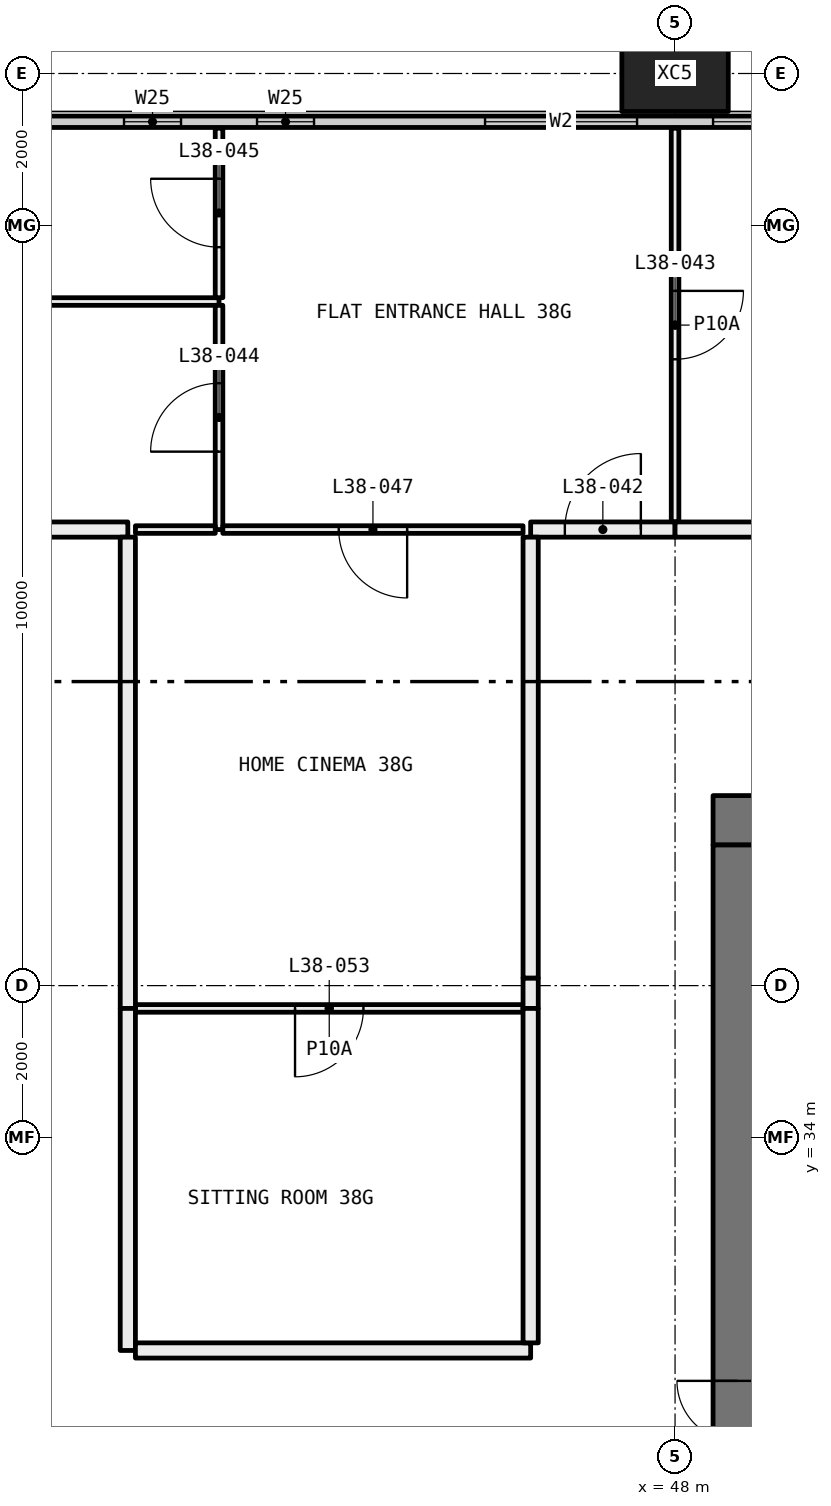
"""IFC4 building model, lengths in metres.
Left out: names, types, materials, properties, quantities, classifications, styles, units other than length and angle.
Written with IfcOpenShell. Run it as: python <this file> out.ifc"""

import sys

from ifc_helpers import new_model, si_unit, direction, frame, frame_2d, origin, origin_2d, place, context, subcontext, project, spatial, rectangle, hollow_rectangle, extrude, element, fill, save


model = new_model("IFC4")
c1 = context("Model", 3, precision=1e-05, world=origin(), true_north=direction((0.0, 1.0)))
c2 = subcontext(c1, "Body", "Model", "MODEL_VIEW")
j1 = project(units=[si_unit("LENGTHUNIT", "METRE"), si_unit("PLANEANGLEUNIT", "RADIAN")], contexts=[c1])
p1 = place(None, origin())
s1 = spatial("IfcSite", under=j1, at=p1, CompositionType="ELEMENT")
p2 = place(p1, origin())
s2 = spatial("IfcBuilding", under=s1, at=p2, CompositionType="ELEMENT")
p3 = place(p2, frame((0.0, 0.0, 144.9)))
s3 = spatial("IfcBuildingStorey", under=s2, at=p3, CompositionType="ELEMENT", Elevation=144.9)
p4 = place(p3, frame((48.0, 48.0, -0.4), z_axis=(0.0, 0.0, 1.0), x_axis=(1.0, 0.0, 0.0)))
e1 = element("IfcColumn", 1, at=p4, inside=s3, PredefinedType="COLUMN", context=c2, shape_type="SweptSolid", body=[
    extrude(hollow_rectangle(XDim=1.4, YDim=1.0, WallThickness=0.055, at=origin_2d()), origin(), (0.0, 0.0, 1.0), 3.45),
])
p5 = place(p3, frame((6.56, 47.365, 0.0), z_axis=(0.0, 0.0, 1.0), x_axis=(1.0, 0.0, 0.0)))
e2 = element("IfcWall", 2, at=p5, inside=s3, PredefinedType="ELEMENTEDWALL", context=c2, shape_type="SweptSolid", body=[
    extrude(rectangle(XDim=58.88, YDim=0.15, at=frame_2d((29.44, 0.0))), origin(), (0.0, 0.0, 1.0), 3.05),
])
p6 = place(p5, frame((0.44, 0.0, 0.45)))
e3 = element("IfcOpeningElement", 3, at=p6, cuts=e2, PredefinedType="OPENING", context=c2, shape_type="SweptSolid", body=[
    extrude(rectangle(XDim=4.5, YDim=2.55, at=frame_2d((2.25, 1.275))), frame((0.0, 0.085, 0.0), z_axis=(0.0, -1.0, 0.0), x_axis=(1.0, 0.0, 0.0)), (0.0, 0.0, 1.0), 0.17),
])
p7 = place(p5, frame((5.94, 0.0, 0.45)))
e4 = element("IfcOpeningElement", 4, at=p7, cuts=e2, PredefinedType="OPENING", context=c2, shape_type="SweptSolid", body=[
    extrude(rectangle(XDim=2.0, YDim=2.55, at=frame_2d((1.0, 1.275))), frame((0.0, 0.085, 0.0), z_axis=(0.0, -1.0, 0.0), x_axis=(1.0, 0.0, 0.0)), (0.0, 0.0, 1.0), 0.17),
])
p8 = place(p5, frame((10.19, 0.0, 0.45)))
e5 = element("IfcOpeningElement", 5, at=p8, cuts=e2, PredefinedType="OPENING", context=c2, shape_type="SweptSolid", body=[
    extrude(rectangle(XDim=0.75, YDim=2.55, at=frame_2d((0.375, 1.275))), frame((0.0, 0.085, 0.0), z_axis=(0.0, -1.0, 0.0), x_axis=(1.0, 0.0, 0.0)), (0.0, 0.0, 1.0), 0.17),
])
p9 = place(p5, frame((11.94, 0.0, 0.45)))
e6 = element("IfcOpeningElement", 6, at=p9, cuts=e2, PredefinedType="OPENING", context=c2, shape_type="SweptSolid", body=[
    extrude(rectangle(XDim=0.75, YDim=2.55, at=frame_2d((0.375, 1.275))), frame((0.0, 0.085, 0.0), z_axis=(0.0, -1.0, 0.0), x_axis=(1.0, 0.0, 0.0)), (0.0, 0.0, 1.0), 0.17),
])
p10 = place(p5, frame((14.94, 0.0, 0.45)))
e7 = element("IfcOpeningElement", 7, at=p10, cuts=e2, PredefinedType="OPENING", context=c2, shape_type="SweptSolid", body=[
    extrude(rectangle(XDim=2.0, YDim=2.55, at=frame_2d((1.0, 1.275))), frame((0.0, 0.085, 0.0), z_axis=(0.0, -1.0, 0.0), x_axis=(1.0, 0.0, 0.0)), (0.0, 0.0, 1.0), 0.17),
])
p11 = place(p5, frame((17.94, 0.0, 0.45)))
e8 = element("IfcOpeningElement", 8, at=p11, cuts=e2, PredefinedType="OPENING", context=c2, shape_type="SweptSolid", body=[
    extrude(rectangle(XDim=2.0, YDim=2.55, at=frame_2d((1.0, 1.275))), frame((0.0, 0.085, 0.0), z_axis=(0.0, -1.0, 0.0), x_axis=(1.0, 0.0, 0.0)), (0.0, 0.0, 1.0), 0.17),
])
p12 = place(p5, frame((22.19, 0.0, 0.45)))
e9 = element("IfcOpeningElement", 9, at=p12, cuts=e2, PredefinedType="OPENING", context=c2, shape_type="SweptSolid", body=[
    extrude(rectangle(XDim=0.75, YDim=2.55, at=frame_2d((0.375, 1.275))), frame((0.0, 0.085, 0.0), z_axis=(0.0, -1.0, 0.0), x_axis=(1.0, 0.0, 0.0)), (0.0, 0.0, 1.0), 0.17),
])
p13 = place(p5, frame((23.94, 0.0, 0.45)))
e10 = element("IfcOpeningElement", 10, at=p13, cuts=e2, PredefinedType="OPENING", context=c2, shape_type="SweptSolid", body=[
    extrude(rectangle(XDim=0.75, YDim=2.55, at=frame_2d((0.375, 1.275))), frame((0.0, 0.085, 0.0), z_axis=(0.0, -1.0, 0.0), x_axis=(1.0, 0.0, 0.0)), (0.0, 0.0, 1.0), 0.17),
])
p14 = place(p5, frame((26.94, 0.0, 0.45)))
e11 = element("IfcOpeningElement", 11, at=p14, cuts=e2, PredefinedType="OPENING", context=c2, shape_type="SweptSolid", body=[
    extrude(rectangle(XDim=2.0, YDim=2.55, at=frame_2d((1.0, 1.275))), frame((0.0, 0.085, 0.0), z_axis=(0.0, -1.0, 0.0), x_axis=(1.0, 0.0, 0.0)), (0.0, 0.0, 1.0), 0.17),
])
p15 = place(p5, frame((29.94, 0.0, 0.45)))
e12 = element("IfcOpeningElement", 12, at=p15, cuts=e2, PredefinedType="OPENING", context=c2, shape_type="SweptSolid", body=[
    extrude(rectangle(XDim=2.0, YDim=2.55, at=frame_2d((1.0, 1.275))), frame((0.0, 0.085, 0.0), z_axis=(0.0, -1.0, 0.0), x_axis=(1.0, 0.0, 0.0)), (0.0, 0.0, 1.0), 0.17),
])
p16 = place(p5, frame((34.19, 0.0, 0.45)))
e13 = element("IfcOpeningElement", 13, at=p16, cuts=e2, PredefinedType="OPENING", context=c2, shape_type="SweptSolid", body=[
    extrude(rectangle(XDim=0.75, YDim=2.55, at=frame_2d((0.375, 1.275))), frame((0.0, 0.085, 0.0), z_axis=(0.0, -1.0, 0.0), x_axis=(1.0, 0.0, 0.0)), (0.0, 0.0, 1.0), 0.17),
])
p17 = place(p5, frame((35.94, 0.0, 0.45)))
e14 = element("IfcOpeningElement", 14, at=p17, cuts=e2, PredefinedType="OPENING", context=c2, shape_type="SweptSolid", body=[
    extrude(rectangle(XDim=0.75, YDim=2.55, at=frame_2d((0.375, 1.275))), frame((0.0, 0.085, 0.0), z_axis=(0.0, -1.0, 0.0), x_axis=(1.0, 0.0, 0.0)), (0.0, 0.0, 1.0), 0.17),
])
p18 = place(p5, frame((38.94, 0.0, 0.45)))
e15 = element("IfcOpeningElement", 15, at=p18, cuts=e2, PredefinedType="OPENING", context=c2, shape_type="SweptSolid", body=[
    extrude(rectangle(XDim=2.0, YDim=2.55, at=frame_2d((1.0, 1.275))), frame((0.0, 0.085, 0.0), z_axis=(0.0, -1.0, 0.0), x_axis=(1.0, 0.0, 0.0)), (0.0, 0.0, 1.0), 0.17),
])
p19 = place(p5, frame((41.94, 0.0, 0.45)))
e16 = element("IfcOpeningElement", 16, at=p19, cuts=e2, PredefinedType="OPENING", context=c2, shape_type="SweptSolid", body=[
    extrude(rectangle(XDim=2.0, YDim=2.55, at=frame_2d((1.0, 1.275))), frame((0.0, 0.085, 0.0), z_axis=(0.0, -1.0, 0.0), x_axis=(1.0, 0.0, 0.0)), (0.0, 0.0, 1.0), 0.17),
])
p20 = place(p5, frame((46.19, 0.0, 0.45)))
e17 = element("IfcOpeningElement", 17, at=p20, cuts=e2, PredefinedType="OPENING", context=c2, shape_type="SweptSolid", body=[
    extrude(rectangle(XDim=0.75, YDim=2.55, at=frame_2d((0.375, 1.275))), frame((0.0, 0.085, 0.0), z_axis=(0.0, -1.0, 0.0), x_axis=(1.0, 0.0, 0.0)), (0.0, 0.0, 1.0), 0.17),
])
p21 = place(p5, frame((47.94, 0.0, 0.45)))
e18 = element("IfcOpeningElement", 18, at=p21, cuts=e2, PredefinedType="OPENING", context=c2, shape_type="SweptSolid", body=[
    extrude(rectangle(XDim=0.75, YDim=2.55, at=frame_2d((0.375, 1.275))), frame((0.0, 0.085, 0.0), z_axis=(0.0, -1.0, 0.0), x_axis=(1.0, 0.0, 0.0)), (0.0, 0.0, 1.0), 0.17),
])
p22 = place(p5, frame((50.94, 0.0, 0.45)))
e19 = element("IfcOpeningElement", 19, at=p22, cuts=e2, PredefinedType="OPENING", context=c2, shape_type="SweptSolid", body=[
    extrude(rectangle(XDim=2.0, YDim=2.55, at=frame_2d((1.0, 1.275))), frame((0.0, 0.085, 0.0), z_axis=(0.0, -1.0, 0.0), x_axis=(1.0, 0.0, 0.0)), (0.0, 0.0, 1.0), 0.17),
])
p23 = place(p5, frame((53.94, 0.0, 0.45)))
e20 = element("IfcOpeningElement", 20, at=p23, cuts=e2, PredefinedType="OPENING", context=c2, shape_type="SweptSolid", body=[
    extrude(rectangle(XDim=4.5, YDim=2.55, at=frame_2d((2.25, 1.275))), frame((0.0, 0.085, 0.0), z_axis=(0.0, -1.0, 0.0), x_axis=(1.0, 0.0, 0.0)), (0.0, 0.0, 1.0), 0.17),
])
p24 = place(p3, frame((42.0, 45.0, 0.0), z_axis=(0.0, 0.0, 1.0), x_axis=(-1.0, 0.0, 0.0)))
e21 = element("IfcWall", 21, at=p24, inside=s3, PredefinedType="PARTITIONING", context=c2, shape_type="SweptSolid", body=[
    extrude(rectangle(XDim=6.1, YDim=0.1, at=frame_2d((3.05, 0.0))), origin(), (0.0, 0.0, 1.0), 2.45),
])
p25 = place(p3, frame((42.0, 42.0, 0.0), z_axis=(0.0, 0.0, 1.0), x_axis=(0.0, 1.0, 0.0)))
e22 = element("IfcWall", 22, at=p25, inside=s3, PredefinedType="PARTITIONING", context=c2, shape_type="SweptSolid", body=[
    extrude(rectangle(XDim=2.95, YDim=0.1, at=frame_2d((1.475, 0.0))), origin(), (0.0, 0.0, 1.0), 3.05),
])
p26 = place(p25, frame((1.025, 0.0, 0.0)))
e23 = element("IfcOpeningElement", 23, at=p26, cuts=e22, PredefinedType="OPENING", context=c2, shape_type="SweptSolid", body=[
    extrude(rectangle(XDim=0.9, YDim=2.1, at=frame_2d((0.45, 1.05))), frame((0.0, 0.06, 0.0), z_axis=(0.0, -1.0, 0.0), x_axis=(1.0, 0.0, 0.0)), (0.0, 0.0, 1.0), 0.12),
])
p27 = place(p3, frame((40.9, 42.0, 0.0), z_axis=(0.0, 0.0, 1.0), x_axis=(1.0, 0.0, 0.0)))
e24 = element("IfcWall", 24, at=p27, inside=s3, PredefinedType="PARTITIONING", context=c2, shape_type="SweptSolid", body=[
    extrude(rectangle(XDim=1.05, YDim=0.1, at=frame_2d((0.525, 0.0))), origin(), (0.0, 0.0, 1.0), 3.05),
])
p28 = place(p3, frame((38.4, 42.0, 0.0), z_axis=(0.0, 0.0, 1.0), x_axis=(1.0, 0.0, 0.0)))
e25 = element("IfcWall", 25, at=p28, inside=s3, PredefinedType="PARTITIONING", context=c2, shape_type="SweptSolid", body=[
    extrude(rectangle(XDim=2.4, YDim=0.2, at=frame_2d((1.2, 0.0))), origin(), (0.0, 0.0, 1.0), 3.05),
])
p29 = place(p3, frame((42.0, 45.05, 0.0), z_axis=(0.0, 0.0, 1.0), x_axis=(0.0, 1.0, 0.0)))
e26 = element("IfcWall", 26, at=p29, inside=s3, PredefinedType="PARTITIONING", context=c2, shape_type="SweptSolid", body=[
    extrude(rectangle(XDim=2.23, YDim=0.1, at=frame_2d((1.115, 0.0))), origin(), (0.0, 0.0, 1.0), 3.05),
])
p30 = place(p29, frame((0.665, 0.0, 0.0)))
e27 = element("IfcOpeningElement", 27, at=p30, cuts=e26, PredefinedType="OPENING", context=c2, shape_type="SweptSolid", body=[
    extrude(rectangle(XDim=0.9, YDim=2.1, at=frame_2d((0.45, 1.05))), frame((0.0, 0.06, 0.0), z_axis=(0.0, -1.0, 0.0), x_axis=(1.0, 0.0, 0.0)), (0.0, 0.0, 1.0), 0.12),
])
p31 = place(p3, frame((48.0, 42.1, 0.0), z_axis=(0.0, 0.0, 1.0), x_axis=(0.0, 1.0, 0.0)))
e28 = element("IfcWall", 28, at=p31, inside=s3, PredefinedType="PARTITIONING", context=c2, shape_type="SweptSolid", body=[
    extrude(rectangle(XDim=5.18, YDim=0.1, at=frame_2d((2.59, 0.0))), origin(), (0.0, 0.0, 1.0), 3.05),
])
p32 = place(p31, frame((2.14, 0.0, 0.0)))
e29 = element("IfcOpeningElement", 29, at=p32, cuts=e28, PredefinedType="OPENING", context=c2, shape_type="SweptSolid", body=[
    extrude(rectangle(XDim=0.9, YDim=2.1, at=frame_2d((0.45, 1.05))), frame((0.0, 0.06, 0.0), z_axis=(0.0, -1.0, 0.0), x_axis=(1.0, 0.0, 0.0)), (0.0, 0.0, 1.0), 0.12),
])
p33 = place(p3, frame((42.05, 42.0, 0.0), z_axis=(0.0, 0.0, 1.0), x_axis=(1.0, 0.0, 0.0)))
e30 = element("IfcWall", 30, at=p33, inside=s3, PredefinedType="PARTITIONING", context=c2, shape_type="SweptSolid", body=[
    extrude(rectangle(XDim=3.95, YDim=0.1, at=frame_2d((1.975, 0.0))), origin(), (0.0, 0.0, 1.0), 3.05),
])
p34 = place(p33, frame((1.525, 0.0, 0.0)))
e31 = element("IfcOpeningElement", 31, at=p34, cuts=e30, PredefinedType="OPENING", context=c2, shape_type="SweptSolid", body=[
    extrude(rectangle(XDim=0.9, YDim=2.1, at=frame_2d((0.45, 1.05))), frame((0.0, 0.06, 0.0), z_axis=(0.0, -1.0, 0.0), x_axis=(1.0, 0.0, 0.0)), (0.0, 0.0, 1.0), 0.12),
])
p35 = place(p3, frame((46.1, 42.0, 0.0), z_axis=(0.0, 0.0, 1.0), x_axis=(1.0, 0.0, 0.0)))
e32 = element("IfcWall", 32, at=p35, inside=s3, PredefinedType="PARTITIONING", context=c2, shape_type="SweptSolid", body=[
    extrude(rectangle(XDim=1.9, YDim=0.2, at=frame_2d((0.95, 0.0))), origin(), (0.0, 0.0, 1.0), 3.05),
])
p36 = place(p35, frame((0.45, 0.0, 0.0)))
e33 = element("IfcOpeningElement", 33, at=p36, cuts=e32, PredefinedType="OPENING", context=c2, shape_type="SweptSolid", body=[
    extrude(rectangle(XDim=1.0, YDim=2.1, at=frame_2d((0.5, 1.05))), frame((0.0, 0.11, 0.0), z_axis=(0.0, -1.0, 0.0), x_axis=(1.0, 0.0, 0.0)), (0.0, 0.0, 1.0), 0.22),
])
p37 = place(p3, frame((48.0, 42.0, 0.0), z_axis=(0.0, 0.0, 1.0), x_axis=(1.0, 0.0, 0.0)))
e34 = element("IfcWall", 34, at=p37, inside=s3, PredefinedType="PARTITIONING", context=c2, shape_type="SweptSolid", body=[
    extrude(rectangle(XDim=12.0, YDim=0.2, at=frame_2d((6.0, 0.0))), origin(), (0.0, 0.0, 1.0), 3.05),
])
p38 = place(p3, frame((40.9, 35.7, 0.0), z_axis=(0.0, 0.0, 1.0), x_axis=(1.0, 0.0, 0.0)))
e35 = element("IfcWall", 35, at=p38, inside=s3, PredefinedType="PARTITIONING", context=c2, shape_type="SweptSolid", body=[
    extrude(rectangle(XDim=5.1, YDim=0.1, at=frame_2d((2.55, 0.0))), origin(), (0.0, 0.0, 1.0), 3.05),
])
p39 = place(p38, frame((2.1, 0.0, 0.0)))
e36 = element("IfcOpeningElement", 36, at=p39, cuts=e35, PredefinedType="OPENING", context=c2, shape_type="SweptSolid", body=[
    extrude(rectangle(XDim=0.9, YDim=2.1, at=frame_2d((0.45, 1.05))), frame((0.0, 0.06, 0.0), z_axis=(0.0, -1.0, 0.0), x_axis=(1.0, 0.0, 0.0)), (0.0, 0.0, 1.0), 0.12),
])
p40 = place(p3, frame((40.8, 41.9, 0.0), z_axis=(0.0, 0.0, 1.0), x_axis=(0.0, -1.0, 0.0)))
e37 = element("IfcWall", 37, at=p40, inside=s3, PredefinedType="PARTITIONING", context=c2, shape_type="SweptSolid", body=[
    extrude(rectangle(XDim=6.2, YDim=0.2, at=frame_2d((3.1, 0.0))), origin(), (0.0, 0.0, 1.0), 2.45),
])
p41 = place(p3, frame((46.1, 35.7, 0.0), z_axis=(0.0, 0.0, 1.0), x_axis=(0.0, 1.0, 0.0)))
e38 = element("IfcWall", 38, at=p41, inside=s3, PredefinedType="PARTITIONING", context=c2, shape_type="SweptSolid", body=[
    extrude(rectangle(XDim=0.4, YDim=0.2, at=frame_2d((0.2, 0.0))), origin(), (0.0, 0.0, 1.0), 2.45),
])
p42 = place(p3, frame((46.1, 36.1, 0.0), z_axis=(0.0, 0.0, 1.0), x_axis=(0.0, 1.0, 0.0)))
e39 = element("IfcWall", 39, at=p42, inside=s3, PredefinedType="PARTITIONING", context=c2, shape_type="SweptSolid", body=[
    extrude(rectangle(XDim=5.8, YDim=0.2, at=frame_2d((2.9, 0.0))), origin(), (0.0, 0.0, 1.0), 3.05),
])
p43 = place(p3, frame((40.8, 35.7, 0.0), z_axis=(0.0, 0.0, 1.0), x_axis=(0.0, -1.0, 0.0)))
e40 = element("IfcWall", 40, at=p43, inside=s3, PredefinedType="PARTITIONING", context=c2, shape_type="SweptSolid", body=[
    extrude(rectangle(XDim=4.5, YDim=0.2, at=frame_2d((2.25, 0.0))), origin(), (0.0, 0.0, 1.0), 3.05),
])
p44 = place(p3, frame((40.9, 31.2, 0.0), z_axis=(0.0, 0.0, 1.0), x_axis=(1.0, 0.0, 0.0)))
e41 = element("IfcWall", 41, at=p44, inside=s3, PredefinedType="PARTITIONING", context=c2, shape_type="SweptSolid", body=[
    extrude(rectangle(XDim=5.2, YDim=0.2, at=frame_2d((2.6, 0.0))), origin(), (0.0, 0.0, 1.0), 3.05),
])
p45 = place(p3, frame((46.1, 31.3, 0.0), z_axis=(0.0, 0.0, 1.0), x_axis=(0.0, 1.0, 0.0)))
e42 = element("IfcWall", 42, at=p45, inside=s3, PredefinedType="PARTITIONING", context=c2, shape_type="SweptSolid", body=[
    extrude(rectangle(XDim=4.4, YDim=0.2, at=frame_2d((2.2, 0.0))), origin(), (0.0, 0.0, 1.0), 3.05),
])
p46 = place(p3, frame((59.5, 38.175, 0.0), z_axis=(0.0, 0.0, 1.0), x_axis=(-1.0, 0.0, 0.0)))
e43 = element("IfcWall", 43, at=p46, inside=s3, PredefinedType="SHEAR", context=c2, shape_type="SweptSolid", body=[
    extrude(rectangle(XDim=11.0, YDim=0.65, at=frame_2d((5.5, 0.0))), origin(), (0.0, 0.0, 1.0), 3.05),
])
p47 = place(p46, frame((8.475, 0.0, 0.0)))
e44 = element("IfcOpeningElement", 44, at=p47, cuts=e43, PredefinedType="OPENING", context=c2, shape_type="SweptSolid", body=[
    extrude(rectangle(XDim=1.6, YDim=2.1, at=frame_2d((0.8, 1.05))), frame((0.0, 0.335, 0.0), z_axis=(0.0, -1.0, 0.0), x_axis=(1.0, 0.0, 0.0)), (0.0, 0.0, 1.0), 0.67),
])
p48 = place(p3, frame((48.825, 22.15, 0.0), z_axis=(0.0, 0.0, 1.0), x_axis=(0.0, 1.0, 0.0)))
e45 = element("IfcWall", 45, at=p48, inside=s3, PredefinedType="SHEAR", context=c2, shape_type="SweptSolid", body=[
    extrude(rectangle(XDim=15.7, YDim=0.65, at=frame_2d((7.85, 0.0))), origin(), (0.0, 0.0, 1.0), 3.05),
])
p49 = place(p48, frame((7.05, 0.0, 0.0)))
e46 = element("IfcOpeningElement", 46, at=p49, cuts=e45, PredefinedType="OPENING", context=c2, shape_type="SweptSolid", body=[
    extrude(rectangle(XDim=1.6, YDim=2.1, at=frame_2d((0.8, 1.05))), frame((0.0, 0.335, 0.0), z_axis=(0.0, -1.0, 0.0), x_axis=(1.0, 0.0, 0.0)), (0.0, 0.0, 1.0), 0.67),
])
p50 = place(p16, origin())
e47 = element("IfcWindow", 47, at=p50, inside=s3, PartitioningType="SINGLE_PANEL", PredefinedType="WINDOW", context=c2, shape_type="SweptSolid", body=[
    extrude(rectangle(XDim=0.75, YDim=2.55, at=frame_2d((0.375, 1.275))), frame((0.0, 0.03, 0.0), z_axis=(0.0, -1.0, 0.0), x_axis=(1.0, 0.0, 0.0)), (0.0, 0.0, 1.0), 0.06),
])
fill(e13, e47)
p51 = place(p17, origin())
e48 = element("IfcWindow", 48, at=p51, inside=s3, PartitioningType="SINGLE_PANEL", PredefinedType="WINDOW", context=c2, shape_type="SweptSolid", body=[
    extrude(rectangle(XDim=0.75, YDim=2.55, at=frame_2d((0.375, 1.275))), frame((0.0, 0.03, 0.0), z_axis=(0.0, -1.0, 0.0), x_axis=(1.0, 0.0, 0.0)), (0.0, 0.0, 1.0), 0.06),
])
fill(e14, e48)
p52 = place(p18, origin())
e49 = element("IfcWindow", 49, at=p52, inside=s3, PartitioningType="SINGLE_PANEL", PredefinedType="WINDOW", context=c2, shape_type="SweptSolid", body=[
    extrude(rectangle(XDim=2.0, YDim=2.55, at=frame_2d((1.0, 1.275))), frame((0.0, 0.03, 0.0), z_axis=(0.0, -1.0, 0.0), x_axis=(1.0, 0.0, 0.0)), (0.0, 0.0, 1.0), 0.06),
])
fill(e15, e49)
p53 = place(p19, origin())
e50 = element("IfcWindow", 50, at=p53, inside=s3, PartitioningType="SINGLE_PANEL", PredefinedType="WINDOW", context=c2, shape_type="SweptSolid", body=[
    extrude(rectangle(XDim=2.0, YDim=2.55, at=frame_2d((1.0, 1.275))), frame((0.0, 0.03, 0.0), z_axis=(0.0, -1.0, 0.0), x_axis=(1.0, 0.0, 0.0)), (0.0, 0.0, 1.0), 0.06),
])
fill(e16, e50)
p54 = place(p36, origin())
e51 = element("IfcDoor", 51, at=p54, inside=s3, OperationType="SINGLE_SWING_LEFT", PredefinedType="DOOR", context=c2, shape_type="SweptSolid", body=[
    extrude(rectangle(XDim=1.0, YDim=2.1, at=frame_2d((0.5, 1.05))), frame((0.0, 0.025, 0.0), z_axis=(0.0, -1.0, 0.0), x_axis=(1.0, 0.0, 0.0)), (0.0, 0.0, 1.0), 0.05),
])
fill(e33, e51)
p55 = place(p32, frame((0.9, 0.0, 0.0), x_axis=(-1.0, 0.0, 0.0)))
e52 = element("IfcDoor", 52, at=p55, inside=s3, OperationType="SINGLE_SWING_RIGHT", PredefinedType="DOOR", context=c2, shape_type="SweptSolid", body=[
    extrude(rectangle(XDim=0.9, YDim=2.1, at=frame_2d((0.45, 1.05))), frame((0.0, 0.025, 0.0), z_axis=(0.0, -1.0, 0.0), x_axis=(1.0, 0.0, 0.0)), (0.0, 0.0, 1.0), 0.05),
])
fill(e29, e52)
p56 = place(p26, origin())
e53 = element("IfcDoor", 53, at=p56, inside=s3, OperationType="SINGLE_SWING_RIGHT", PredefinedType="DOOR", context=c2, shape_type="SweptSolid", body=[
    extrude(rectangle(XDim=0.9, YDim=2.1, at=frame_2d((0.45, 1.05))), frame((0.0, 0.025, 0.0), z_axis=(0.0, -1.0, 0.0), x_axis=(1.0, 0.0, 0.0)), (0.0, 0.0, 1.0), 0.05),
])
fill(e23, e53)
p57 = place(p30, origin())
e54 = element("IfcDoor", 54, at=p57, inside=s3, OperationType="SINGLE_SWING_LEFT", PredefinedType="DOOR", context=c2, shape_type="SweptSolid", body=[
    extrude(rectangle(XDim=0.9, YDim=2.1, at=frame_2d((0.45, 1.05))), frame((0.0, 0.025, 0.0), z_axis=(0.0, -1.0, 0.0), x_axis=(1.0, 0.0, 0.0)), (0.0, 0.0, 1.0), 0.05),
])
fill(e27, e54)
p58 = place(p34, frame((0.9, 0.0, 0.0), x_axis=(-1.0, 0.0, 0.0)))
e55 = element("IfcDoor", 55, at=p58, inside=s3, OperationType="SINGLE_SWING_RIGHT", PredefinedType="DOOR", context=c2, shape_type="SweptSolid", body=[
    extrude(rectangle(XDim=0.9, YDim=2.1, at=frame_2d((0.45, 1.05))), frame((0.0, 0.025, 0.0), z_axis=(0.0, -1.0, 0.0), x_axis=(1.0, 0.0, 0.0)), (0.0, 0.0, 1.0), 0.05),
])
fill(e31, e55)
p59 = place(p39, frame((0.9, 0.0, 0.0), x_axis=(-1.0, 0.0, 0.0)))
e56 = element("IfcDoor", 56, at=p59, inside=s3, OperationType="SINGLE_SWING_LEFT", PredefinedType="DOOR", context=c2, shape_type="SweptSolid", body=[
    extrude(rectangle(XDim=0.9, YDim=2.1, at=frame_2d((0.45, 1.05))), frame((0.0, 0.025, 0.0), z_axis=(0.0, -1.0, 0.0), x_axis=(1.0, 0.0, 0.0)), (0.0, 0.0, 1.0), 0.05),
])
fill(e36, e56)
p60 = place(p49, origin())
e57 = element("IfcDoor", 57, at=p60, inside=s3, OperationType="DOUBLE_DOOR_SINGLE_SWING", PredefinedType="DOOR", context=c2, shape_type="SweptSolid", body=[
    extrude(rectangle(XDim=1.6, YDim=2.1, at=frame_2d((0.8, 1.05))), frame((0.0, 0.025, 0.0), z_axis=(0.0, -1.0, 0.0), x_axis=(1.0, 0.0, 0.0)), (0.0, 0.0, 1.0), 0.05),
])
fill(e46, e57)
save(model, sys.argv[1])
